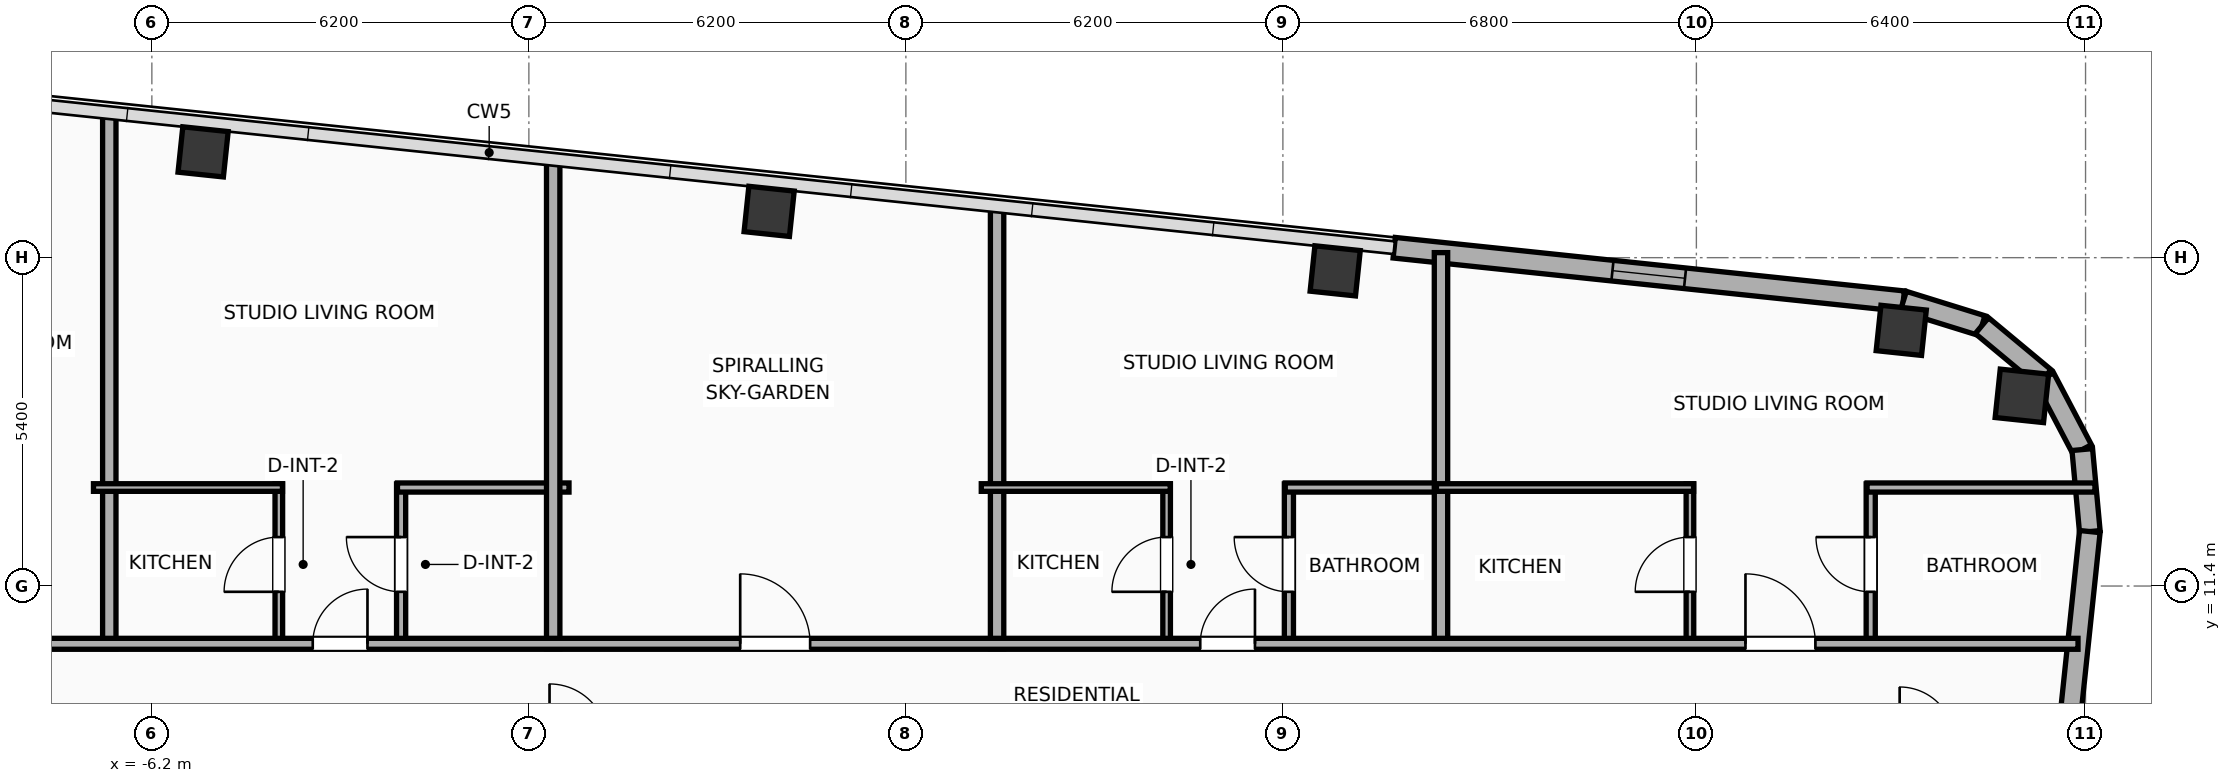
"""IFC4 building model, lengths in metres.
Left out: names, types, materials, properties, quantities, classifications, styles, units other than length and angle.
Written with IfcOpenShell. Run it as: python <this file> out.ifc"""

import sys

from ifc_helpers import new_model, si_unit, direction, frame, frame_2d, origin, origin_2d, place, context, subcontext, project, spatial, rectangle, hollow_rectangle, hollow_circle, extrude, element, fill, save


model = new_model("IFC4")
c1 = context("Model", 3, precision=1e-05, world=origin(), true_north=direction((0.0, 1.0)))
c2 = subcontext(c1, "Body", "Model", "MODEL_VIEW")
j1 = project(units=[si_unit("LENGTHUNIT", "METRE"), si_unit("PLANEANGLEUNIT", "RADIAN")], contexts=[c1])
p1 = place(None, origin())
s1 = spatial("IfcSite", under=j1, at=p1, CompositionType="ELEMENT")
p2 = place(p1, origin())
s2 = spatial("IfcBuilding", under=s1, at=p2, CompositionType="ELEMENT")
p3 = place(p2, frame((0.0, 0.0, 263.9)))
s3 = spatial("IfcBuildingStorey", under=s2, at=p3, CompositionType="ELEMENT", Elevation=263.9)
p4 = place(p3, frame((24.553, 14.527, 0.0), z_axis=(0.0, 0.0, 1.0), x_axis=(0.994521895368, -0.104528463268, 0.0)))
e1 = element("IfcColumn", 1, at=p4, inside=s3, PredefinedType="COLUMN", context=c2, shape_type="SweptSolid", body=[
    extrude(hollow_circle(Radius=0.4, WallThickness=0.028, at=origin_2d()), origin(), (0.0, 0.0, 1.0), 3.9),
])
for number, where, z_axis, x_axis in (
    (2, (22.569, 15.604, 0.0), (0.0, 0.0, 1.0), (0.995, -0.105, 0.0)),
    (3, (13.26, 16.583, 0.0), (0.0, 0.0, 1.0), (0.995, -0.105, 0.0)),
    (4, (3.952, 17.561, 0.0), (0.0, 0.0, 1.0), (0.995, -0.105, 0.0)),
    (5, (-5.357, 18.54, 0.0), (0.0, 0.0, 1.0), (0.995, -0.105, 0.0)),
):
    element("IfcColumn", number, at=place(p3, frame(where, z_axis=z_axis, x_axis=x_axis)), inside=s3, PredefinedType="COLUMN", context=c2, shape_type="SweptSolid", body=[
        extrude(hollow_rectangle(XDim=0.75, YDim=0.75, WallThickness=0.025, at=origin_2d()), origin(), (0.0, 0.0, 1.0), 3.9),
    ])
p5 = place(p3, frame((14.231, 16.964, 0.0), z_axis=(0.0, 0.0, 1.0), x_axis=(0.994522285292, -0.104524753323, 0.0)))
e6 = element("IfcWall", 6, at=p5, inside=s3, PredefinedType="ELEMENTEDWALL", context=c2, shape_type="SweptSolid", body=[
    extrude(rectangle(XDim=8.418, YDim=0.34, at=frame_2d((4.209, 0.0))), origin(), (0.0, 0.0, 1.0), 3.65),
])
p6 = place(p5, frame((3.609, 0.0, 0.75)))
e7 = element("IfcOpeningElement", 7, at=p6, cuts=e6, PredefinedType="OPENING", context=c2, shape_type="SweptSolid", body=[
    extrude(rectangle(XDim=1.2, YDim=2.05, at=frame_2d((0.6, 1.025))), frame((0.0, 0.18, 0.0), z_axis=(0.0, -1.0, 0.0), x_axis=(1.0, 0.0, 0.0)), (0.0, 0.0, 1.0), 0.36),
])
p7 = place(p3, frame((22.603, 16.084, 0.0), z_axis=(0.0, 0.0, 1.0), x_axis=(0.955007802701, -0.296580674994, 0.0)))
e8 = element("IfcWall", 8, at=p7, inside=s3, PredefinedType="ELEMENTEDWALL", context=c2, shape_type="SweptSolid", body=[
    extrude(rectangle(XDim=1.354, YDim=0.34, at=frame_2d((0.677, 0.0))), origin(), (0.0, 0.0, 1.0), 3.65),
])
for number, where, z_axis, x_axis in (
    (9, (23.896, 15.682, 0.0), (0.0, 0.0, 1.0), (0.769, -0.64, 0.0)),
    (10, (24.924, 14.827, 0.0), (0.0, 0.0, 1.0), (0.466, -0.885, 0.0)),
):
    element("IfcWall", number, at=place(p3, frame(where, z_axis=z_axis, x_axis=x_axis)), inside=s3, PredefinedType="ELEMENTEDWALL", context=c2, shape_type="SweptSolid", body=[
        extrude(rectangle(XDim=1.337, YDim=0.34, at=frame_2d((0.668, 0.0))), origin(), (0.0, 0.0, 1.0), 3.65),
    ])
p8 = place(p3, frame((25.546, 13.644, 0.0), z_axis=(0.0, 0.0, 1.0), x_axis=(0.091592370975, -0.995796584438, 0.0)))
e11 = element("IfcWall", 11, at=p8, inside=s3, PredefinedType="ELEMENTEDWALL", context=c2, shape_type="SweptSolid", body=[
    extrude(rectangle(XDim=1.354, YDim=0.34, at=frame_2d((0.677, 0.0))), origin(), (0.0, 0.0, 1.0), 3.65),
])
p9 = place(p3, frame((25.67, 12.296, 0.0), z_axis=(0.0, 0.0, 1.0), x_axis=(-0.104533282919, -0.994521388791, 0.0)))
e12 = element("IfcWall", 12, at=p9, inside=s3, PredefinedType="ELEMENTEDWALL", context=c2, shape_type="SweptSolid", body=[
    extrude(rectangle(XDim=30.366, YDim=0.34, at=frame_2d((15.183, 0.0))), origin(), (0.0, 0.0, 1.0), 3.65),
])
p10 = place(p9, frame((5.842, 0.0, 0.75)))
e13 = element("IfcOpeningElement", 13, at=p10, cuts=e12, PredefinedType="OPENING", context=c2, shape_type="SweptSolid", body=[
    extrude(rectangle(XDim=1.8, YDim=2.1, at=frame_2d((0.9, 1.05))), frame((0.0, 0.18, 0.0), z_axis=(0.0, -1.0, 0.0), x_axis=(1.0, 0.0, 0.0)), (0.0, 0.0, 1.0), 0.36),
])
p11 = place(p9, frame((18.005, 0.0, 0.75)))
e14 = element("IfcOpeningElement", 14, at=p11, cuts=e12, PredefinedType="OPENING", context=c2, shape_type="SweptSolid", body=[
    extrude(rectangle(XDim=1.2, YDim=2.05, at=frame_2d((0.6, 1.025))), frame((0.0, 0.18, 0.0), z_axis=(0.0, -1.0, 0.0), x_axis=(1.0, 0.0, 0.0)), (0.0, 0.0, 1.0), 0.36),
])
p12 = place(p3, frame((-6.9, 10.37, 0.0), z_axis=(0.0, 0.0, 1.0), x_axis=(0.0, 1.0, 0.0)))
e15 = element("IfcWall", 15, at=p12, inside=s3, PredefinedType="PARTITIONING", context=c2, shape_type="SweptSolid", body=[
    extrude(rectangle(XDim=8.814, YDim=0.22, at=frame_2d((4.407, 0.0))), origin(), (0.0, 0.0, 1.0), 3.65),
])
p13 = place(p3, frame((-4.112, 10.43, 0.0), z_axis=(0.0, 0.0, 1.0), x_axis=(0.0, 1.0, 0.0)))
e16 = element("IfcWall", 16, at=p13, inside=s3, PredefinedType="PARTITIONING", context=c2, shape_type="SweptSolid", body=[
    extrude(rectangle(XDim=2.65, YDim=0.125, at=frame_2d((1.325, 0.0))), origin(), (0.0, 0.0, 1.0), 3.65),
])
p14 = place(p13, frame((0.875, 0.0, 0.0)))
e17 = element("IfcOpeningElement", 17, at=p14, cuts=e16, PredefinedType="OPENING", context=c2, shape_type="SweptSolid", body=[
    extrude(rectangle(XDim=0.9, YDim=2.05, at=frame_2d((0.45, 1.025))), frame((0.0, 0.073, 0.0), z_axis=(0.0, -1.0, 0.0), x_axis=(1.0, 0.0, 0.0)), (0.0, 0.0, 1.0), 0.145),
])
p15 = place(p3, frame((-2.101, 10.43, 0.0), z_axis=(0.0, 0.0, 1.0), x_axis=(0.0, 1.0, 0.0)))
e18 = element("IfcWall", 18, at=p15, inside=s3, PredefinedType="PLUMBINGWALL", context=c2, shape_type="SweptSolid", body=[
    extrude(rectangle(XDim=2.65, YDim=0.15, at=frame_2d((1.325, 0.0))), origin(), (0.0, 0.0, 1.0), 3.65),
])
p16 = place(p15, frame((0.875, 0.0, 0.0)))
e19 = element("IfcOpeningElement", 19, at=p16, cuts=e18, PredefinedType="OPENING", context=c2, shape_type="SweptSolid", body=[
    extrude(rectangle(XDim=0.9, YDim=2.05, at=frame_2d((0.45, 1.025))), frame((0.0, 0.085, 0.0), z_axis=(0.0, -1.0, 0.0), x_axis=(1.0, 0.0, 0.0)), (0.0, 0.0, 1.0), 0.17),
])
p17 = place(p3, frame((-7.16, 13.02, 0.0), z_axis=(0.0, 0.0, 1.0), x_axis=(1.0, 0.0, 0.0)))
e20 = element("IfcWall", 20, at=p17, inside=s3, PredefinedType="PARTITIONING", context=c2, shape_type="SweptSolid", body=[
    extrude(rectangle(XDim=3.108, YDim=0.125, at=frame_2d((1.554, 0.0))), origin(), (0.0, 0.0, 1.0), 3.65),
])
p18 = place(p3, frame((-2.161, 13.02, 0.0), z_axis=(0.0, 0.0, 1.0), x_axis=(1.0, 0.0, 0.0)))
e21 = element("IfcWall", 21, at=p18, inside=s3, PredefinedType="PLUMBINGWALL", context=c2, shape_type="SweptSolid", body=[
    extrude(rectangle(XDim=2.821, YDim=0.15, at=frame_2d((1.41, 0.0))), origin(), (0.0, 0.0, 1.0), 3.65),
])
p19 = place(p3, frame((0.4, 10.37, 0.0), z_axis=(0.0, 0.0, 1.0), x_axis=(0.0, 1.0, 0.0)))
e22 = element("IfcWall", 22, at=p19, inside=s3, PredefinedType="PARTITIONING", context=c2, shape_type="SweptSolid", body=[
    extrude(rectangle(XDim=8.047, YDim=0.22, at=frame_2d((4.023, 0.0))), origin(), (0.0, 0.0, 1.0), 3.65),
])
p20 = place(p3, frame((7.7, 10.37, 0.0), z_axis=(0.0, 0.0, 1.0), x_axis=(0.0, 1.0, 0.0)))
e23 = element("IfcWall", 23, at=p20, inside=s3, PredefinedType="PARTITIONING", context=c2, shape_type="SweptSolid", body=[
    extrude(rectangle(XDim=7.28, YDim=0.22, at=frame_2d((3.64, 0.0))), origin(), (0.0, 0.0, 1.0), 3.65),
])
p21 = place(p3, frame((10.488, 10.43, 0.0), z_axis=(0.0, 0.0, 1.0), x_axis=(0.0, 1.0, 0.0)))
e24 = element("IfcWall", 24, at=p21, inside=s3, PredefinedType="PARTITIONING", context=c2, shape_type="SweptSolid", body=[
    extrude(rectangle(XDim=2.65, YDim=0.125, at=frame_2d((1.325, 0.0))), origin(), (0.0, 0.0, 1.0), 3.65),
])
p22 = place(p21, frame((0.875, 0.0, 0.0)))
e25 = element("IfcOpeningElement", 25, at=p22, cuts=e24, PredefinedType="OPENING", context=c2, shape_type="SweptSolid", body=[
    extrude(rectangle(XDim=0.9, YDim=2.05, at=frame_2d((0.45, 1.025))), frame((0.0, 0.073, 0.0), z_axis=(0.0, -1.0, 0.0), x_axis=(1.0, 0.0, 0.0)), (0.0, 0.0, 1.0), 0.145),
])
p23 = place(p3, frame((12.499, 10.43, 0.0), z_axis=(0.0, 0.0, 1.0), x_axis=(0.0, 1.0, 0.0)))
e26 = element("IfcWall", 26, at=p23, inside=s3, PredefinedType="PLUMBINGWALL", context=c2, shape_type="SweptSolid", body=[
    extrude(rectangle(XDim=2.65, YDim=0.15, at=frame_2d((1.325, 0.0))), origin(), (0.0, 0.0, 1.0), 3.65),
])
p24 = place(p23, frame((0.875, 0.0, 0.0)))
e27 = element("IfcOpeningElement", 27, at=p24, cuts=e26, PredefinedType="OPENING", context=c2, shape_type="SweptSolid", body=[
    extrude(rectangle(XDim=0.9, YDim=2.05, at=frame_2d((0.45, 1.025))), frame((0.0, 0.085, 0.0), z_axis=(0.0, -1.0, 0.0), x_axis=(1.0, 0.0, 0.0)), (0.0, 0.0, 1.0), 0.17),
])
p25 = place(p3, frame((7.44, 13.02, 0.0), z_axis=(0.0, 0.0, 1.0), x_axis=(1.0, 0.0, 0.0)))
e28 = element("IfcWall", 28, at=p25, inside=s3, PredefinedType="PARTITIONING", context=c2, shape_type="SweptSolid", body=[
    extrude(rectangle(XDim=3.108, YDim=0.125, at=frame_2d((1.554, 0.0))), origin(), (0.0, 0.0, 1.0), 3.65),
])
p26 = place(p3, frame((12.439, 13.02, 0.0), z_axis=(0.0, 0.0, 1.0), x_axis=(1.0, 0.0, 0.0)))
e29 = element("IfcWall", 29, at=p26, inside=s3, PredefinedType="PLUMBINGWALL", context=c2, shape_type="SweptSolid", body=[
    extrude(rectangle(XDim=2.636, YDim=0.15, at=frame_2d((1.318, 0.0))), origin(), (0.0, 0.0, 1.0), 3.65),
])
p27 = place(p3, frame((15.0, 10.37, 0.0), z_axis=(0.0, 0.0, 1.0), x_axis=(0.0, 1.0, 0.0)))
e30 = element("IfcWall", 30, at=p27, inside=s3, PredefinedType="PARTITIONING", context=c2, shape_type="SweptSolid", body=[
    extrude(rectangle(XDim=6.513, YDim=0.22, at=frame_2d((3.256, 0.0))), origin(), (0.0, 0.0, 1.0), 3.65),
])
p28 = place(p3, frame((19.094, 10.43, 0.0), z_axis=(0.0, 0.0, 1.0), x_axis=(0.0, 1.0, 0.0)))
e31 = element("IfcWall", 31, at=p28, inside=s3, PredefinedType="PARTITIONING", context=c2, shape_type="SweptSolid", body=[
    extrude(rectangle(XDim=2.65, YDim=0.125, at=frame_2d((1.325, 0.0))), origin(), (0.0, 0.0, 1.0), 3.65),
])
p29 = place(p28, frame((0.875, 0.0, 0.0)))
e32 = element("IfcOpeningElement", 32, at=p29, cuts=e31, PredefinedType="OPENING", context=c2, shape_type="SweptSolid", body=[
    extrude(rectangle(XDim=0.9, YDim=2.05, at=frame_2d((0.45, 1.025))), frame((0.0, 0.073, 0.0), z_axis=(0.0, -1.0, 0.0), x_axis=(1.0, 0.0, 0.0)), (0.0, 0.0, 1.0), 0.145),
])
p30 = place(p3, frame((22.067, 10.43, 0.0), z_axis=(0.0, 0.0, 1.0), x_axis=(0.0, 1.0, 0.0)))
e33 = element("IfcWall", 33, at=p30, inside=s3, PredefinedType="PLUMBINGWALL", context=c2, shape_type="SweptSolid", body=[
    extrude(rectangle(XDim=2.65, YDim=0.15, at=frame_2d((1.325, 0.0))), origin(), (0.0, 0.0, 1.0), 3.65),
])
p31 = place(p30, frame((0.875, 0.0, 0.0)))
e34 = element("IfcOpeningElement", 34, at=p31, cuts=e33, PredefinedType="OPENING", context=c2, shape_type="SweptSolid", body=[
    extrude(rectangle(XDim=0.9, YDim=2.05, at=frame_2d((0.45, 1.025))), frame((0.0, 0.085, 0.0), z_axis=(0.0, -1.0, 0.0), x_axis=(1.0, 0.0, 0.0)), (0.0, 0.0, 1.0), 0.17),
])
p32 = place(p3, frame((14.925, 13.02, 0.0), z_axis=(0.0, 0.0, 1.0), x_axis=(1.0, 0.0, 0.0)))
e35 = element("IfcWall", 35, at=p32, inside=s3, PredefinedType="PARTITIONING", context=c2, shape_type="SweptSolid", body=[
    extrude(rectangle(XDim=4.229, YDim=0.125, at=frame_2d((2.115, 0.0))), origin(), (0.0, 0.0, 1.0), 3.65),
])
p33 = place(p3, frame((22.007, 13.02, 0.0), z_axis=(0.0, 0.0, 1.0), x_axis=(1.0, 0.0, 0.0)))
e36 = element("IfcWall", 36, at=p33, inside=s3, PredefinedType="PLUMBINGWALL", context=c2, shape_type="SweptSolid", body=[
    extrude(rectangle(XDim=3.747, YDim=0.15, at=frame_2d((1.874, 0.0))), origin(), (0.0, 0.0, 1.0), 3.65),
])
p34 = place(p3, frame((-28.479, 10.45, 0.0), z_axis=(0.0, 0.0, 1.0), x_axis=(1.0, 0.0, 0.0)))
e37 = element("IfcWall", 37, at=p34, inside=s3, PredefinedType="PARTITIONING", context=c2, shape_type="SweptSolid", body=[
    extrude(rectangle(XDim=53.956, YDim=0.18, at=frame_2d((26.978, 0.0))), origin(), (0.0, 0.0, 1.0), 3.65),
])
p35 = place(p34, frame((3.143, 0.0, 0.0)))
e38 = element("IfcOpeningElement", 38, at=p35, cuts=e37, PredefinedType="OPENING", context=c2, shape_type="SweptSolid", body=[
    extrude(rectangle(XDim=0.9, YDim=2.05, at=frame_2d((0.45, 1.025))), frame((0.0, 0.1, 0.0), z_axis=(0.0, -1.0, 0.0), x_axis=(1.0, 0.0, 0.0)), (0.0, 0.0, 1.0), 0.2),
])
p36 = place(p34, frame((11.328, 0.0, 0.0)))
e39 = element("IfcOpeningElement", 39, at=p36, cuts=e37, PredefinedType="OPENING", context=c2, shape_type="SweptSolid", body=[
    extrude(rectangle(XDim=1.15, YDim=2.05, at=frame_2d((0.575, 1.025))), frame((0.0, 0.1, 0.0), z_axis=(0.0, -1.0, 0.0), x_axis=(1.0, 0.0, 0.0)), (0.0, 0.0, 1.0), 0.2),
])
p37 = place(p34, frame((18.628, 0.0, 0.0)))
e40 = element("IfcOpeningElement", 40, at=p37, cuts=e37, PredefinedType="OPENING", context=c2, shape_type="SweptSolid", body=[
    extrude(rectangle(XDim=1.15, YDim=2.05, at=frame_2d((0.575, 1.025))), frame((0.0, 0.1, 0.0), z_axis=(0.0, -1.0, 0.0), x_axis=(1.0, 0.0, 0.0)), (0.0, 0.0, 1.0), 0.2),
])
p38 = place(p34, frame((24.925, 0.0, 0.0)))
e41 = element("IfcOpeningElement", 41, at=p38, cuts=e37, PredefinedType="OPENING", context=c2, shape_type="SweptSolid", body=[
    extrude(rectangle(XDim=0.9, YDim=2.05, at=frame_2d((0.45, 1.025))), frame((0.0, 0.1, 0.0), z_axis=(0.0, -1.0, 0.0), x_axis=(1.0, 0.0, 0.0)), (0.0, 0.0, 1.0), 0.2),
])
p39 = place(p34, frame((31.955, 0.0, 0.0)))
e42 = element("IfcOpeningElement", 42, at=p39, cuts=e37, PredefinedType="OPENING", context=c2, shape_type="SweptSolid", body=[
    extrude(rectangle(XDim=1.15, YDim=2.05, at=frame_2d((0.575, 1.025))), frame((0.0, 0.1, 0.0), z_axis=(0.0, -1.0, 0.0), x_axis=(1.0, 0.0, 0.0)), (0.0, 0.0, 1.0), 0.2),
])
p40 = place(p34, frame((39.52, 0.0, 0.0)))
e43 = element("IfcOpeningElement", 43, at=p40, cuts=e37, PredefinedType="OPENING", context=c2, shape_type="SweptSolid", body=[
    extrude(rectangle(XDim=0.9, YDim=2.05, at=frame_2d((0.45, 1.025))), frame((0.0, 0.1, 0.0), z_axis=(0.0, -1.0, 0.0), x_axis=(1.0, 0.0, 0.0)), (0.0, 0.0, 1.0), 0.2),
])
p41 = place(p34, frame((48.487, 0.0, 0.0)))
e44 = element("IfcOpeningElement", 44, at=p41, cuts=e37, PredefinedType="OPENING", context=c2, shape_type="SweptSolid", body=[
    extrude(rectangle(XDim=1.15, YDim=2.05, at=frame_2d((0.575, 1.025))), frame((0.0, 0.1, 0.0), z_axis=(0.0, -1.0, 0.0), x_axis=(1.0, 0.0, 0.0)), (0.0, 0.0, 1.0), 0.2),
])
p42 = place(p6, origin())
e45 = element("IfcWindow", 45, at=p42, inside=s3, PartitioningType="SINGLE_PANEL", PredefinedType="WINDOW", context=c2, shape_type="SweptSolid", body=[
    extrude(rectangle(XDim=1.2, YDim=2.05, at=frame_2d((0.6, 1.025))), frame((0.0, 0.03, 0.0), z_axis=(0.0, -1.0, 0.0), x_axis=(1.0, 0.0, 0.0)), (0.0, 0.0, 1.0), 0.06),
])
fill(e7, e45)
p43 = place(p14, origin())
e46 = element("IfcDoor", 46, at=p43, inside=s3, OperationType="SINGLE_SWING_LEFT", PredefinedType="DOOR", context=c2, shape_type="SweptSolid", body=[
    extrude(rectangle(XDim=0.9, YDim=2.05, at=frame_2d((0.45, 1.025))), frame((0.0, 0.025, 0.0), z_axis=(0.0, -1.0, 0.0), x_axis=(1.0, 0.0, 0.0)), (0.0, 0.0, 1.0), 0.05),
])
fill(e17, e46)
p44 = place(p16, origin())
e47 = element("IfcDoor", 47, at=p44, inside=s3, OperationType="SINGLE_SWING_RIGHT", PredefinedType="DOOR", context=c2, shape_type="SweptSolid", body=[
    extrude(rectangle(XDim=0.9, YDim=2.05, at=frame_2d((0.45, 1.025))), frame((0.0, 0.025, 0.0), z_axis=(0.0, -1.0, 0.0), x_axis=(1.0, 0.0, 0.0)), (0.0, 0.0, 1.0), 0.05),
])
fill(e19, e47)
p45 = place(p22, origin())
e48 = element("IfcDoor", 48, at=p45, inside=s3, OperationType="SINGLE_SWING_LEFT", PredefinedType="DOOR", context=c2, shape_type="SweptSolid", body=[
    extrude(rectangle(XDim=0.9, YDim=2.05, at=frame_2d((0.45, 1.025))), frame((0.0, 0.025, 0.0), z_axis=(0.0, -1.0, 0.0), x_axis=(1.0, 0.0, 0.0)), (0.0, 0.0, 1.0), 0.05),
])
fill(e25, e48)
p46 = place(p24, origin())
e49 = element("IfcDoor", 49, at=p46, inside=s3, OperationType="SINGLE_SWING_RIGHT", PredefinedType="DOOR", context=c2, shape_type="SweptSolid", body=[
    extrude(rectangle(XDim=0.9, YDim=2.05, at=frame_2d((0.45, 1.025))), frame((0.0, 0.025, 0.0), z_axis=(0.0, -1.0, 0.0), x_axis=(1.0, 0.0, 0.0)), (0.0, 0.0, 1.0), 0.05),
])
fill(e27, e49)
p47 = place(p29, origin())
e50 = element("IfcDoor", 50, at=p47, inside=s3, OperationType="SINGLE_SWING_LEFT", PredefinedType="DOOR", context=c2, shape_type="SweptSolid", body=[
    extrude(rectangle(XDim=0.9, YDim=2.05, at=frame_2d((0.45, 1.025))), frame((0.0, 0.025, 0.0), z_axis=(0.0, -1.0, 0.0), x_axis=(1.0, 0.0, 0.0)), (0.0, 0.0, 1.0), 0.05),
])
fill(e32, e50)
p48 = place(p31, origin())
e51 = element("IfcDoor", 51, at=p48, inside=s3, OperationType="SINGLE_SWING_RIGHT", PredefinedType="DOOR", context=c2, shape_type="SweptSolid", body=[
    extrude(rectangle(XDim=0.9, YDim=2.05, at=frame_2d((0.45, 1.025))), frame((0.0, 0.025, 0.0), z_axis=(0.0, -1.0, 0.0), x_axis=(1.0, 0.0, 0.0)), (0.0, 0.0, 1.0), 0.05),
])
fill(e34, e51)
p49 = place(p38, origin())
e52 = element("IfcDoor", 52, at=p49, inside=s3, OperationType="SINGLE_SWING_RIGHT", PredefinedType="DOOR", context=c2, shape_type="SweptSolid", body=[
    extrude(rectangle(XDim=0.9, YDim=2.05, at=frame_2d((0.45, 1.025))), frame((0.0, 0.025, 0.0), z_axis=(0.0, -1.0, 0.0), x_axis=(1.0, 0.0, 0.0)), (0.0, 0.0, 1.0), 0.05),
])
fill(e41, e52)
p50 = place(p39, origin())
e53 = element("IfcDoor", 53, at=p50, inside=s3, OperationType="SINGLE_SWING_LEFT", PredefinedType="DOOR", context=c2, shape_type="SweptSolid", body=[
    extrude(rectangle(XDim=1.15, YDim=2.05, at=frame_2d((0.575, 1.025))), frame((0.0, 0.025, 0.0), z_axis=(0.0, -1.0, 0.0), x_axis=(1.0, 0.0, 0.0)), (0.0, 0.0, 1.0), 0.05),
])
fill(e42, e53)
p51 = place(p40, origin())
e54 = element("IfcDoor", 54, at=p51, inside=s3, OperationType="SINGLE_SWING_RIGHT", PredefinedType="DOOR", context=c2, shape_type="SweptSolid", body=[
    extrude(rectangle(XDim=0.9, YDim=2.05, at=frame_2d((0.45, 1.025))), frame((0.0, 0.025, 0.0), z_axis=(0.0, -1.0, 0.0), x_axis=(1.0, 0.0, 0.0)), (0.0, 0.0, 1.0), 0.05),
])
fill(e43, e54)
p52 = place(p41, origin())
e55 = element("IfcDoor", 55, at=p52, inside=s3, OperationType="SINGLE_SWING_LEFT", PredefinedType="DOOR", context=c2, shape_type="SweptSolid", body=[
    extrude(rectangle(XDim=1.15, YDim=2.05, at=frame_2d((0.575, 1.025))), frame((0.0, 0.025, 0.0), z_axis=(0.0, -1.0, 0.0), x_axis=(1.0, 0.0, 0.0)), (0.0, 0.0, 1.0), 0.05),
])
fill(e44, e55)
save(model, sys.argv[1])
